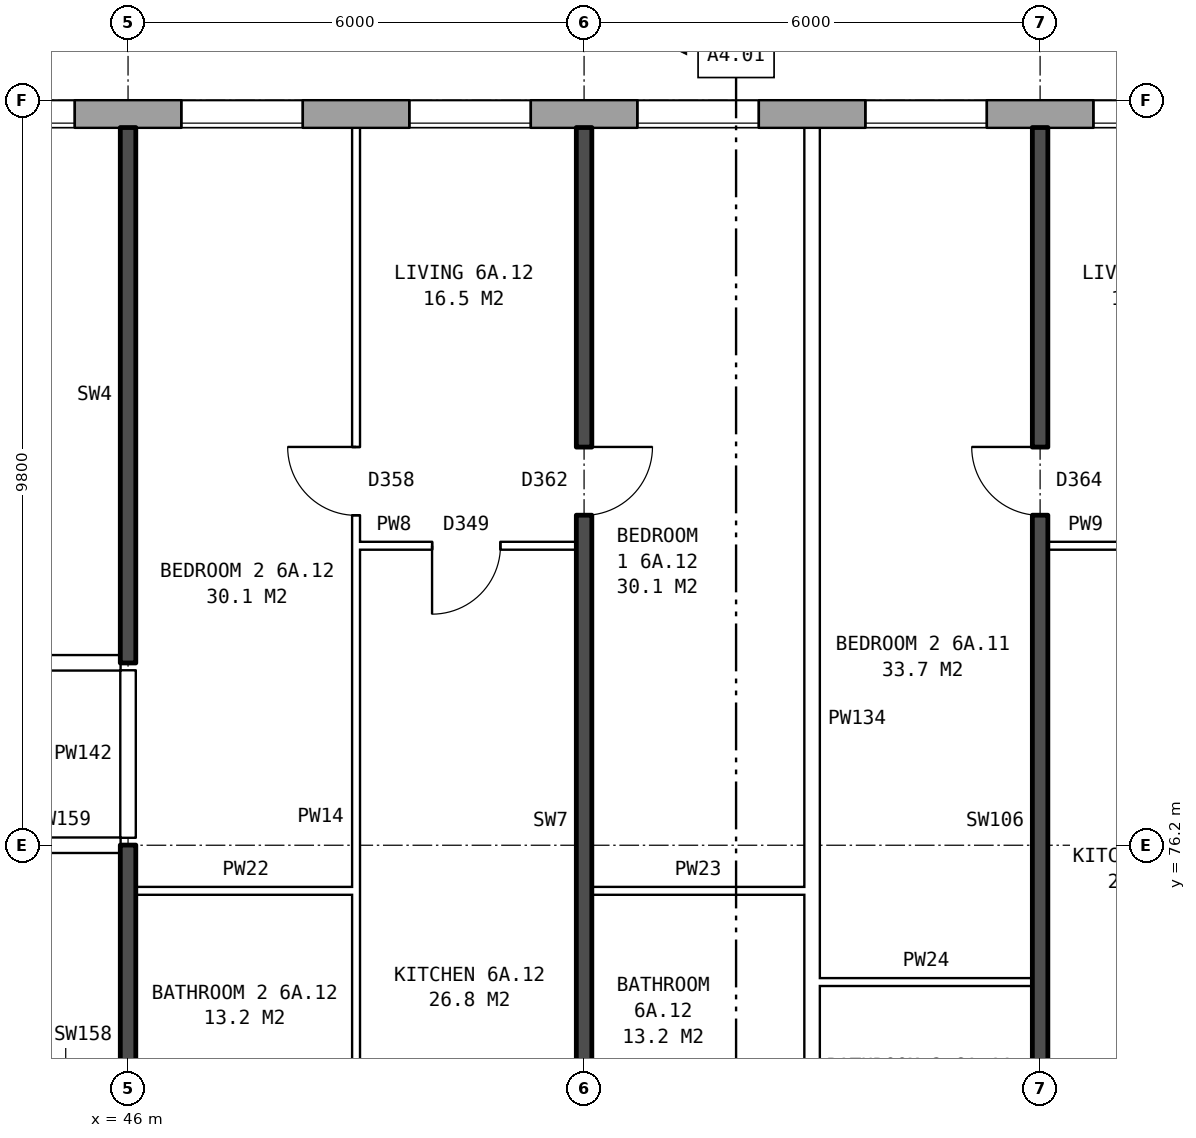
"""IFC4 building model, lengths in metres.
Left out: names, types, materials, properties, quantities, classifications, styles, units other than length and angle.
Written with IfcOpenShell. Run it as: python <this file> out.ifc"""

import sys

from ifc_helpers import new_model, si_unit, direction, frame, frame_2d, origin, place, context, subcontext, project, spatial, rectangle, extrude, element, fill, save


model = new_model("IFC4")
c1 = context("Model", 3, precision=1e-05, world=origin(), true_north=direction((0.0, 1.0)))
c2 = subcontext(c1, "Body", "Model", "MODEL_VIEW")
j1 = project(units=[si_unit("LENGTHUNIT", "METRE"), si_unit("PLANEANGLEUNIT", "RADIAN")], contexts=[c1])
p1 = place(None, origin())
s1 = spatial("IfcSite", under=j1, at=p1, CompositionType="ELEMENT")
p2 = place(p1, origin())
s2 = spatial("IfcBuilding", under=s1, at=p2, CompositionType="ELEMENT")
p3 = place(p2, frame((0.0, 0.0, 25.7)))
s3 = spatial("IfcBuildingStorey", under=s2, at=p3, CompositionType="ELEMENT", Elevation=25.7)
p4 = place(p3, frame((72.925, 85.82, 0.0), z_axis=(0.0, 0.0, 1.0), x_axis=(-1.0, 0.0, 0.0)))
e1 = element("IfcWall", 1, at=p4, inside=s3, PredefinedType="STANDARD", context=c2, shape_type="SweptSolid", body=[
    extrude(rectangle(XDim=50.101, YDim=0.36, at=frame_2d((25.05, 0.0))), origin(), (0.0, 0.0, 1.0), 2.85),
])
p5 = place(p4, frame((0.625, 0.0, 0.8)))
e2 = element("IfcOpeningElement", 2, at=p5, cuts=e1, PredefinedType="OPENING", context=c2, shape_type="SweptSolid", body=[
    extrude(rectangle(XDim=1.6, YDim=1.8, at=frame_2d((0.8, 0.9))), frame((0.0, 0.19, 0.0), z_axis=(0.0, -1.0, 0.0), x_axis=(1.0, 0.0, 0.0)), (0.0, 0.0, 1.0), 0.38),
])
p6 = place(p4, frame((3.625, 0.0, 0.8)))
e3 = element("IfcOpeningElement", 3, at=p6, cuts=e1, PredefinedType="OPENING", context=c2, shape_type="SweptSolid", body=[
    extrude(rectangle(XDim=1.6, YDim=1.8, at=frame_2d((0.8, 0.9))), frame((0.0, 0.19, 0.0), z_axis=(0.0, -1.0, 0.0), x_axis=(1.0, 0.0, 0.0)), (0.0, 0.0, 1.0), 0.38),
])
p7 = place(p4, frame((5.525, 0.0, 0.8)))
e4 = element("IfcOpeningElement", 4, at=p7, cuts=e1, PredefinedType="OPENING", context=c2, shape_type="SweptSolid", body=[
    extrude(rectangle(XDim=1.4, YDim=1.8, at=frame_2d((0.7, 0.9))), frame((0.0, 0.19, 0.0), z_axis=(0.0, -1.0, 0.0), x_axis=(1.0, 0.0, 0.0)), (0.0, 0.0, 1.0), 0.38),
])
p8 = place(p4, frame((9.175, 0.0, 0.15)))
e5 = element("IfcOpeningElement", 5, at=p8, cuts=e1, PredefinedType="OPENING", context=c2, shape_type="SweptSolid", body=[
    extrude(rectangle(XDim=1.0, YDim=0.9, at=frame_2d((0.5, 0.45))), frame((0.0, 0.19, 0.0), z_axis=(0.0, -1.0, 0.0), x_axis=(1.0, 0.0, 0.0)), (0.0, 0.0, 1.0), 0.38),
])
p9 = place(p4, frame((12.625, 0.0, 0.8)))
e6 = element("IfcOpeningElement", 6, at=p9, cuts=e1, PredefinedType="OPENING", context=c2, shape_type="SweptSolid", body=[
    extrude(rectangle(XDim=1.6, YDim=1.8, at=frame_2d((0.8, 0.9))), frame((0.0, 0.19, 0.0), z_axis=(0.0, -1.0, 0.0), x_axis=(1.0, 0.0, 0.0)), (0.0, 0.0, 1.0), 0.38),
])
p10 = place(p4, frame((15.625, 0.0, 0.8)))
e7 = element("IfcOpeningElement", 7, at=p10, cuts=e1, PredefinedType="OPENING", context=c2, shape_type="SweptSolid", body=[
    extrude(rectangle(XDim=1.6, YDim=1.8, at=frame_2d((0.8, 0.9))), frame((0.0, 0.19, 0.0), z_axis=(0.0, -1.0, 0.0), x_axis=(1.0, 0.0, 0.0)), (0.0, 0.0, 1.0), 0.38),
])
p11 = place(p4, frame((18.625, 0.0, 0.8)))
e8 = element("IfcOpeningElement", 8, at=p11, cuts=e1, PredefinedType="OPENING", context=c2, shape_type="SweptSolid", body=[
    extrude(rectangle(XDim=1.6, YDim=1.8, at=frame_2d((0.8, 0.9))), frame((0.0, 0.19, 0.0), z_axis=(0.0, -1.0, 0.0), x_axis=(1.0, 0.0, 0.0)), (0.0, 0.0, 1.0), 0.38),
])
p12 = place(p4, frame((21.625, 0.0, 0.8)))
e9 = element("IfcOpeningElement", 9, at=p12, cuts=e1, PredefinedType="OPENING", context=c2, shape_type="SweptSolid", body=[
    extrude(rectangle(XDim=1.6, YDim=1.8, at=frame_2d((0.8, 0.9))), frame((0.0, 0.19, 0.0), z_axis=(0.0, -1.0, 0.0), x_axis=(1.0, 0.0, 0.0)), (0.0, 0.0, 1.0), 0.38),
])
p13 = place(p4, frame((24.625, 0.0, 0.8)))
e10 = element("IfcOpeningElement", 10, at=p13, cuts=e1, PredefinedType="OPENING", context=c2, shape_type="SweptSolid", body=[
    extrude(rectangle(XDim=1.6, YDim=1.8, at=frame_2d((0.8, 0.9))), frame((0.0, 0.19, 0.0), z_axis=(0.0, -1.0, 0.0), x_axis=(1.0, 0.0, 0.0)), (0.0, 0.0, 1.0), 0.38),
])
p14 = place(p4, frame((27.625, 0.0, 0.8)))
e11 = element("IfcOpeningElement", 11, at=p14, cuts=e1, PredefinedType="OPENING", context=c2, shape_type="SweptSolid", body=[
    extrude(rectangle(XDim=1.6, YDim=1.8, at=frame_2d((0.8, 0.9))), frame((0.0, 0.19, 0.0), z_axis=(0.0, -1.0, 0.0), x_axis=(1.0, 0.0, 0.0)), (0.0, 0.0, 1.0), 0.38),
])
p15 = place(p4, frame((30.625, 0.0, 0.8)))
e12 = element("IfcOpeningElement", 12, at=p15, cuts=e1, PredefinedType="OPENING", context=c2, shape_type="SweptSolid", body=[
    extrude(rectangle(XDim=1.6, YDim=1.8, at=frame_2d((0.8, 0.9))), frame((0.0, 0.19, 0.0), z_axis=(0.0, -1.0, 0.0), x_axis=(1.0, 0.0, 0.0)), (0.0, 0.0, 1.0), 0.38),
])
p16 = place(p4, frame((33.625, 0.0, 0.8)))
e13 = element("IfcOpeningElement", 13, at=p16, cuts=e1, PredefinedType="OPENING", context=c2, shape_type="SweptSolid", body=[
    extrude(rectangle(XDim=1.6, YDim=1.8, at=frame_2d((0.8, 0.9))), frame((0.0, 0.19, 0.0), z_axis=(0.0, -1.0, 0.0), x_axis=(1.0, 0.0, 0.0)), (0.0, 0.0, 1.0), 0.38),
])
p17 = place(p4, frame((36.625, 0.0, 0.8)))
e14 = element("IfcOpeningElement", 14, at=p17, cuts=e1, PredefinedType="OPENING", context=c2, shape_type="SweptSolid", body=[
    extrude(rectangle(XDim=1.6, YDim=1.8, at=frame_2d((0.8, 0.9))), frame((0.0, 0.19, 0.0), z_axis=(0.0, -1.0, 0.0), x_axis=(1.0, 0.0, 0.0)), (0.0, 0.0, 1.0), 0.38),
])
p18 = place(p4, frame((39.125, 0.0, 0.8)))
e15 = element("IfcOpeningElement", 15, at=p18, cuts=e1, PredefinedType="OPENING", context=c2, shape_type="SweptSolid", body=[
    extrude(rectangle(XDim=0.8, YDim=0.9, at=frame_2d((0.4, 0.45))), frame((0.0, 0.19, 0.0), z_axis=(0.0, -1.0, 0.0), x_axis=(1.0, 0.0, 0.0)), (0.0, 0.0, 1.0), 0.38),
])
p19 = place(p4, frame((42.625, 0.0, 0.8)))
e16 = element("IfcOpeningElement", 16, at=p19, cuts=e1, PredefinedType="OPENING", context=c2, shape_type="SweptSolid", body=[
    extrude(rectangle(XDim=1.6, YDim=1.8, at=frame_2d((0.8, 0.9))), frame((0.0, 0.19, 0.0), z_axis=(0.0, -1.0, 0.0), x_axis=(1.0, 0.0, 0.0)), (0.0, 0.0, 1.0), 0.38),
])
p20 = place(p4, frame((45.625, 0.0, 0.8)))
e17 = element("IfcOpeningElement", 17, at=p20, cuts=e1, PredefinedType="OPENING", context=c2, shape_type="SweptSolid", body=[
    extrude(rectangle(XDim=1.6, YDim=1.8, at=frame_2d((0.8, 0.9))), frame((0.0, 0.19, 0.0), z_axis=(0.0, -1.0, 0.0), x_axis=(1.0, 0.0, 0.0)), (0.0, 0.0, 1.0), 0.38),
])
p21 = place(p4, frame((7.225, 0.0, 1.4)))
e18 = element("IfcOpeningElement", 18, at=p21, cuts=e1, PredefinedType="OPENING", context=c2, shape_type="SweptSolid", body=[
    extrude(rectangle(XDim=1.0, YDim=1.2, at=frame_2d((0.5, 0.6))), frame((0.0, 0.19, 0.0), z_axis=(0.0, -1.0, 0.0), x_axis=(1.0, 0.0, 0.0)), (0.0, 0.0, 1.0), 0.38),
])
p22 = place(p4, frame((10.525, 0.0, 0.15)))
e19 = element("IfcOpeningElement", 19, at=p22, cuts=e1, PredefinedType="OPENING", context=c2, shape_type="SweptSolid", body=[
    extrude(rectangle(XDim=1.2, YDim=1.8, at=frame_2d((0.6, 0.9))), frame((0.0, 0.19, 0.0), z_axis=(0.0, -1.0, 0.0), x_axis=(1.0, 0.0, 0.0)), (0.0, 0.0, 1.0), 0.38),
])
p23 = place(p4, frame((41.375, 0.0, 1.7)))
e20 = element("IfcOpeningElement", 20, at=p23, cuts=e1, PredefinedType="OPENING", context=c2, shape_type="SweptSolid", body=[
    extrude(rectangle(XDim=0.8, YDim=0.9, at=frame_2d((0.4, 0.45))), frame((0.0, 0.19, 0.0), z_axis=(0.0, -1.0, 0.0), x_axis=(1.0, 0.0, 0.0)), (0.0, 0.0, 1.0), 0.38),
])
p24 = place(p3, frame((55.1, 74.4, 0.0), z_axis=(0.0, 0.0, 1.0), x_axis=(1.0, 0.0, 0.0)))
e21 = element("IfcWall", 21, at=p24, inside=s3, PredefinedType="PARTITIONING", context=c2, shape_type="SweptSolid", body=[
    extrude(rectangle(XDim=2.8, YDim=0.1, at=frame_2d((1.4, 0.0))), origin(), (0.0, 0.0, 1.0), 2.85),
])
p25 = place(p3, frame((46.1, 75.6, 0.0), z_axis=(0.0, 0.0, 1.0), x_axis=(1.0, 0.0, 0.0)))
e22 = element("IfcWall", 22, at=p25, inside=s3, PredefinedType="PARTITIONING", context=c2, shape_type="SweptSolid", body=[
    extrude(rectangle(XDim=2.9, YDim=0.1, at=frame_2d((1.45, 0.0))), origin(), (0.0, 0.0, 1.0), 2.85),
])
p26 = place(p3, frame((52.1, 75.6, 0.0), z_axis=(0.0, 0.0, 1.0), x_axis=(1.0, 0.0, 0.0)))
e23 = element("IfcWall", 23, at=p26, inside=s3, PredefinedType="PARTITIONING", context=c2, shape_type="SweptSolid", body=[
    extrude(rectangle(XDim=2.8, YDim=0.1, at=frame_2d((1.4, 0.0))), origin(), (0.0, 0.0, 1.0), 2.85),
])
p27 = place(p3, frame((44.36, 76.2, 0.0), z_axis=(0.0, 0.0, 1.0), x_axis=(1.0, 0.0, 0.0)))
e24 = element("IfcWall", 24, at=p27, inside=s3, PredefinedType="PARTITIONING", context=c2, shape_type="SweptSolid", body=[
    extrude(rectangle(XDim=1.54, YDim=0.2, at=frame_2d((0.77, 0.0))), origin(), (0.0, 0.0, 1.0), 2.85),
])
p28 = place(p3, frame((20.11, 78.6, 0.0), z_axis=(0.0, 0.0, 1.0), x_axis=(1.0, 0.0, 0.0)))
e25 = element("IfcWall", 25, at=p28, inside=s3, PredefinedType="PARTITIONING", context=c2, shape_type="SweptSolid", body=[
    extrude(rectangle(XDim=25.79, YDim=0.2, at=frame_2d((12.895, 0.0))), origin(), (0.0, 0.0, 1.0), 2.85),
])
p29 = place(p28, frame((22.34, 0.0, 0.0)))
e26 = element("IfcOpeningElement", 26, at=p29, cuts=e25, PredefinedType="OPENING", context=c2, shape_type="SweptSolid", body=[
    extrude(rectangle(XDim=1.0, YDim=2.1, at=frame_2d((0.5, 1.05))), frame((0.0, 0.11, 0.0), z_axis=(0.0, -1.0, 0.0), x_axis=(1.0, 0.0, 0.0)), (0.0, 0.0, 1.0), 0.22),
])
p30 = place(p28, frame((10.39, 0.0, 0.0)))
e27 = element("IfcOpeningElement", 27, at=p30, cuts=e25, PredefinedType="OPENING", context=c2, shape_type="SweptSolid", body=[
    extrude(rectangle(XDim=1.0, YDim=2.1, at=frame_2d((0.5, 1.05))), frame((0.0, 0.11, 0.0), z_axis=(0.0, -1.0, 0.0), x_axis=(1.0, 0.0, 0.0)), (0.0, 0.0, 1.0), 0.22),
])
p31 = place(p28, frame((2.245, 0.0, 0.0)))
e28 = element("IfcOpeningElement", 28, at=p31, cuts=e25, PredefinedType="OPENING", context=c2, shape_type="SweptSolid", body=[
    extrude(rectangle(XDim=1.0, YDim=2.1, at=frame_2d((0.5, 1.05))), frame((0.0, 0.11, 0.0), z_axis=(0.0, -1.0, 0.0), x_axis=(1.0, 0.0, 0.0)), (0.0, 0.0, 1.0), 0.22),
])
p32 = place(p3, frame((49.0, 80.14, 0.0), z_axis=(0.0, 0.0, 1.0), x_axis=(1.0, 0.0, 0.0)))
e29 = element("IfcWall", 29, at=p32, inside=s3, PredefinedType="PARTITIONING", context=c2, shape_type="SweptSolid", body=[
    extrude(rectangle(XDim=2.9, YDim=0.1, at=frame_2d((1.45, 0.0))), origin(), (0.0, 0.0, 1.0), 2.85),
])
p33 = place(p32, frame((1.0, 0.0, 0.0)))
e30 = element("IfcOpeningElement", 30, at=p33, cuts=e29, PredefinedType="OPENING", context=c2, shape_type="SweptSolid", body=[
    extrude(rectangle(XDim=0.9, YDim=2.1, at=frame_2d((0.45, 1.05))), frame((0.0, 0.06, 0.0), z_axis=(0.0, -1.0, 0.0), x_axis=(1.0, 0.0, 0.0)), (0.0, 0.0, 1.0), 0.12),
])
p34 = place(p3, frame((58.1, 80.14, 0.0), z_axis=(0.0, 0.0, 1.0), x_axis=(1.0, 0.0, 0.0)))
e31 = element("IfcWall", 31, at=p34, inside=s3, PredefinedType="PARTITIONING", context=c2, shape_type="SweptSolid", body=[
    extrude(rectangle(XDim=2.9, YDim=0.1, at=frame_2d((1.45, 0.0))), origin(), (0.0, 0.0, 1.0), 2.85),
])
p35 = place(p34, frame((1.0, 0.0, 0.0)))
e32 = element("IfcOpeningElement", 32, at=p35, cuts=e31, PredefinedType="OPENING", context=c2, shape_type="SweptSolid", body=[
    extrude(rectangle(XDim=0.9, YDim=2.1, at=frame_2d((0.45, 1.05))), frame((0.0, 0.06, 0.0), z_axis=(0.0, -1.0, 0.0), x_axis=(1.0, 0.0, 0.0)), (0.0, 0.0, 1.0), 0.12),
])
p36 = place(p3, frame((46.0, 71.2, 0.0), z_axis=(0.0, 0.0, 1.0), x_axis=(0.0, 1.0, 0.0)))
e33 = element("IfcWall", 33, at=p36, inside=s3, PredefinedType="SOLIDWALL", context=c2, shape_type="SweptSolid", body=[
    extrude(rectangle(XDim=5.0, YDim=0.2, at=frame_2d((2.5, 0.0))), origin(), (0.0, 0.0, 1.0), 2.85),
])
p37 = place(p3, frame((46.0, 76.3, 0.0), z_axis=(0.0, 0.0, 1.0), x_axis=(0.0, 1.0, 0.0)))
e34 = element("IfcWall", 34, at=p37, inside=s3, PredefinedType="PARTITIONING", context=c2, shape_type="SweptSolid", body=[
    extrude(rectangle(XDim=2.2, YDim=0.2, at=frame_2d((1.1, 0.0))), origin(), (0.0, 0.0, 1.0), 2.85),
])
p38 = place(p3, frame((46.0, 78.6, 0.0), z_axis=(0.0, 0.0, 1.0), x_axis=(0.0, 1.0, 0.0)))
e35 = element("IfcWall", 35, at=p38, inside=s3, PredefinedType="SOLIDWALL", context=c2, shape_type="SweptSolid", body=[
    extrude(rectangle(XDim=7.04, YDim=0.2, at=frame_2d((3.52, 0.0))), origin(), (0.0, 0.0, 1.0), 2.85),
])
p39 = place(p3, frame((49.0, 71.3, 0.0), z_axis=(0.0, 0.0, 1.0), x_axis=(0.0, 1.0, 0.0)))
e36 = element("IfcWall", 36, at=p39, inside=s3, PredefinedType="PARTITIONING", context=c2, shape_type="SweptSolid", body=[
    extrude(rectangle(XDim=14.34, YDim=0.1, at=frame_2d((7.17, 0.0))), origin(), (0.0, 0.0, 1.0), 2.85),
])
p40 = place(p39, frame((9.24, 0.0, 0.0)))
e37 = element("IfcOpeningElement", 37, at=p40, cuts=e36, PredefinedType="OPENING", context=c2, shape_type="SweptSolid", body=[
    extrude(rectangle(XDim=0.9, YDim=2.1, at=frame_2d((0.45, 1.05))), frame((0.0, 0.06, 0.0), z_axis=(0.0, -1.0, 0.0), x_axis=(1.0, 0.0, 0.0)), (0.0, 0.0, 1.0), 0.12),
])
p41 = place(p39, frame((0.4, 0.0, 0.0)))
e38 = element("IfcOpeningElement", 38, at=p41, cuts=e36, PredefinedType="OPENING", context=c2, shape_type="SweptSolid", body=[
    extrude(rectangle(XDim=0.9, YDim=2.1, at=frame_2d((0.45, 1.05))), frame((0.0, 0.06, 0.0), z_axis=(0.0, -1.0, 0.0), x_axis=(1.0, 0.0, 0.0)), (0.0, 0.0, 1.0), 0.12),
])
p42 = place(p3, frame((52.0, 71.2, 0.0), z_axis=(0.0, 0.0, 1.0), x_axis=(0.0, 1.0, 0.0)))
e39 = element("IfcWall", 39, at=p42, inside=s3, PredefinedType="SOLIDWALL", context=c2, shape_type="SweptSolid", body=[
    extrude(rectangle(XDim=14.44, YDim=0.2, at=frame_2d((7.22, 0.0))), origin(), (0.0, 0.0, 1.0), 2.85),
])
p43 = place(p42, frame((9.34, 0.0, 0.0)))
e40 = element("IfcOpeningElement", 40, at=p43, cuts=e39, PredefinedType="OPENING", context=c2, shape_type="SweptSolid", body=[
    extrude(rectangle(XDim=0.9, YDim=2.1, at=frame_2d((0.45, 1.05))), frame((0.0, 0.11, 0.0), z_axis=(0.0, -1.0, 0.0), x_axis=(1.0, 0.0, 0.0)), (0.0, 0.0, 1.0), 0.22),
])
p44 = place(p42, frame((0.4, 0.0, 0.0)))
e41 = element("IfcOpeningElement", 41, at=p44, cuts=e39, PredefinedType="OPENING", context=c2, shape_type="SweptSolid", body=[
    extrude(rectangle(XDim=0.9, YDim=2.1, at=frame_2d((0.45, 1.05))), frame((0.0, 0.11, 0.0), z_axis=(0.0, -1.0, 0.0), x_axis=(1.0, 0.0, 0.0)), (0.0, 0.0, 1.0), 0.22),
])
p45 = place(p3, frame((55.0, 71.3, 0.0), z_axis=(0.0, 0.0, 1.0), x_axis=(0.0, 1.0, 0.0)))
e42 = element("IfcWall", 42, at=p45, inside=s3, PredefinedType="PARTITIONING", context=c2, shape_type="SweptSolid", body=[
    extrude(rectangle(XDim=14.34, YDim=0.2, at=frame_2d((7.17, 0.0))), origin(), (0.0, 0.0, 1.0), 2.85),
])
p46 = place(p3, frame((58.0, 71.2, 0.0), z_axis=(0.0, 0.0, 1.0), x_axis=(0.0, 1.0, 0.0)))
e43 = element("IfcWall", 43, at=p46, inside=s3, PredefinedType="SOLIDWALL", context=c2, shape_type="SweptSolid", body=[
    extrude(rectangle(XDim=14.44, YDim=0.2, at=frame_2d((7.22, 0.0))), origin(), (0.0, 0.0, 1.0), 2.85),
])
p47 = place(p46, frame((9.34, 0.0, 0.0)))
e44 = element("IfcOpeningElement", 44, at=p47, cuts=e43, PredefinedType="OPENING", context=c2, shape_type="SweptSolid", body=[
    extrude(rectangle(XDim=0.9, YDim=2.1, at=frame_2d((0.45, 1.05))), frame((0.0, 0.11, 0.0), z_axis=(0.0, -1.0, 0.0), x_axis=(1.0, 0.0, 0.0)), (0.0, 0.0, 1.0), 0.22),
])
p48 = place(p46, frame((0.4, 0.0, 0.0)))
e45 = element("IfcOpeningElement", 45, at=p48, cuts=e43, PredefinedType="OPENING", context=c2, shape_type="SweptSolid", body=[
    extrude(rectangle(XDim=0.9, YDim=2.1, at=frame_2d((0.45, 1.05))), frame((0.0, 0.11, 0.0), z_axis=(0.0, -1.0, 0.0), x_axis=(1.0, 0.0, 0.0)), (0.0, 0.0, 1.0), 0.22),
])
p49 = place(p9, origin())
e46 = element("IfcWindow", 46, at=p49, inside=s3, PartitioningType="SINGLE_PANEL", PredefinedType="WINDOW", context=c2, shape_type="SweptSolid", body=[
    extrude(rectangle(XDim=1.6, YDim=1.8, at=frame_2d((0.8, 0.9))), frame((0.0, 0.15, 0.0), z_axis=(0.0, -1.0, 0.0), x_axis=(1.0, 0.0, 0.0)), (0.0, 0.0, 1.0), 0.06),
])
fill(e6, e46)
p50 = place(p10, origin())
e47 = element("IfcWindow", 47, at=p50, inside=s3, PartitioningType="SINGLE_PANEL", PredefinedType="WINDOW", context=c2, shape_type="SweptSolid", body=[
    extrude(rectangle(XDim=1.6, YDim=1.8, at=frame_2d((0.8, 0.9))), frame((0.0, 0.15, 0.0), z_axis=(0.0, -1.0, 0.0), x_axis=(1.0, 0.0, 0.0)), (0.0, 0.0, 1.0), 0.06),
])
fill(e7, e47)
p51 = place(p11, origin())
e48 = element("IfcWindow", 48, at=p51, inside=s3, PartitioningType="SINGLE_PANEL", PredefinedType="WINDOW", context=c2, shape_type="SweptSolid", body=[
    extrude(rectangle(XDim=1.6, YDim=1.8, at=frame_2d((0.8, 0.9))), frame((0.0, 0.15, 0.0), z_axis=(0.0, -1.0, 0.0), x_axis=(1.0, 0.0, 0.0)), (0.0, 0.0, 1.0), 0.06),
])
fill(e8, e48)
p52 = place(p12, origin())
e49 = element("IfcWindow", 49, at=p52, inside=s3, PartitioningType="SINGLE_PANEL", PredefinedType="WINDOW", context=c2, shape_type="SweptSolid", body=[
    extrude(rectangle(XDim=1.6, YDim=1.8, at=frame_2d((0.8, 0.9))), frame((0.0, 0.15, 0.0), z_axis=(0.0, -1.0, 0.0), x_axis=(1.0, 0.0, 0.0)), (0.0, 0.0, 1.0), 0.06),
])
fill(e9, e49)
p53 = place(p13, origin())
e50 = element("IfcWindow", 50, at=p53, inside=s3, PartitioningType="SINGLE_PANEL", PredefinedType="WINDOW", context=c2, shape_type="SweptSolid", body=[
    extrude(rectangle(XDim=1.6, YDim=1.8, at=frame_2d((0.8, 0.9))), frame((0.0, 0.15, 0.0), z_axis=(0.0, -1.0, 0.0), x_axis=(1.0, 0.0, 0.0)), (0.0, 0.0, 1.0), 0.06),
])
fill(e10, e50)
p54 = place(p14, origin())
e51 = element("IfcWindow", 51, at=p54, inside=s3, PartitioningType="SINGLE_PANEL", PredefinedType="WINDOW", context=c2, shape_type="SweptSolid", body=[
    extrude(rectangle(XDim=1.6, YDim=1.8, at=frame_2d((0.8, 0.9))), frame((0.0, 0.15, 0.0), z_axis=(0.0, -1.0, 0.0), x_axis=(1.0, 0.0, 0.0)), (0.0, 0.0, 1.0), 0.06),
])
fill(e11, e51)
p55 = place(p47, origin())
e52 = element("IfcDoor", 52, at=p55, inside=s3, OperationType="SINGLE_SWING_RIGHT", PredefinedType="DOOR", context=c2, shape_type="SweptSolid", body=[
    extrude(rectangle(XDim=0.9, YDim=2.1, at=frame_2d((0.45, 1.05))), frame((0.0, 0.025, 0.0), z_axis=(0.0, -1.0, 0.0), x_axis=(1.0, 0.0, 0.0)), (0.0, 0.0, 1.0), 0.05),
])
fill(e44, e52)
p56 = place(p43, frame((0.9, 0.0, 0.0), z_axis=(0.0, 0.0, 1.0), x_axis=(-1.0, 0.0, 0.0)))
e53 = element("IfcDoor", 53, at=p56, inside=s3, OperationType="SINGLE_SWING_LEFT", PredefinedType="DOOR", context=c2, shape_type="SweptSolid", body=[
    extrude(rectangle(XDim=0.9, YDim=2.1, at=frame_2d((0.45, 1.05))), frame((0.0, 0.025, 0.0), z_axis=(0.0, -1.0, 0.0), x_axis=(1.0, 0.0, 0.0)), (0.0, 0.0, 1.0), 0.05),
])
fill(e40, e53)
p57 = place(p40, origin())
e54 = element("IfcDoor", 54, at=p57, inside=s3, OperationType="SINGLE_SWING_RIGHT", PredefinedType="DOOR", context=c2, shape_type="SweptSolid", body=[
    extrude(rectangle(XDim=0.9, YDim=2.1, at=frame_2d((0.45, 1.05))), frame((0.0, 0.025, 0.0), z_axis=(0.0, -1.0, 0.0), x_axis=(1.0, 0.0, 0.0)), (0.0, 0.0, 1.0), 0.05),
])
fill(e37, e54)
p58 = place(p33, frame((0.9, 0.0, 0.0), z_axis=(0.0, 0.0, 1.0), x_axis=(-1.0, 0.0, 0.0)))
e55 = element("IfcDoor", 55, at=p58, inside=s3, OperationType="SINGLE_SWING_RIGHT", PredefinedType="DOOR", context=c2, shape_type="SweptSolid", body=[
    extrude(rectangle(XDim=0.9, YDim=2.1, at=frame_2d((0.45, 1.05))), frame((0.0, 0.025, 0.0), z_axis=(0.0, -1.0, 0.0), x_axis=(1.0, 0.0, 0.0)), (0.0, 0.0, 1.0), 0.05),
])
fill(e30, e55)
save(model, sys.argv[1])
